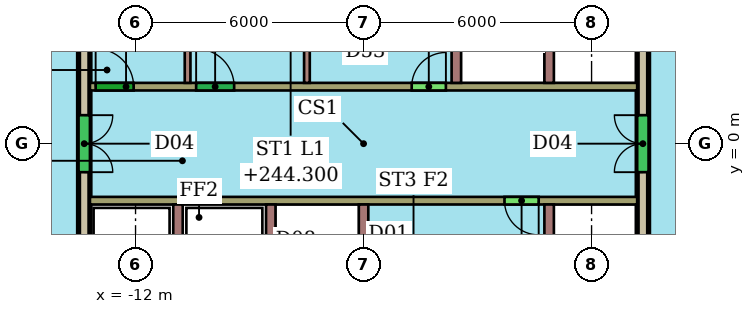
"""IFC4 building model, lengths in metres.
Left out: names, types, materials, properties, quantities, classifications, styles, units other than length and angle.
Written with IfcOpenShell. Run it as: python <this file> out.ifc"""

import sys

from ifc_helpers import new_model, si_unit, direction, frame, frame_2d, origin, place, context, subcontext, project, spatial, rectangle, extrude, element, fill, save


model = new_model("IFC4")
c1 = context("Model", 3, precision=1e-05, world=origin(), true_north=direction((0.0, 1.0)))
c2 = subcontext(c1, "Body", "Model", "MODEL_VIEW")
j1 = project(units=[si_unit("LENGTHUNIT", "METRE"), si_unit("PLANEANGLEUNIT", "RADIAN")], contexts=[c1])
p1 = place(None, origin())
s1 = spatial("IfcSite", under=j1, at=p1, CompositionType="ELEMENT")
p2 = place(p1, origin())
s2 = spatial("IfcBuilding", under=s1, at=p2, CompositionType="ELEMENT")
p3 = place(p2, frame((0.0, 0.0, 242.5)))
s3 = spatial("IfcBuildingStorey", under=s2, at=p3, CompositionType="ELEMENT", Elevation=242.5)
p4 = place(p3, frame((-13.35, 7.65, 0.0), z_axis=(0.0, 0.0, 1.0), x_axis=(0.0, -1.0, 0.0)))
e1 = element("IfcWall", 1, at=p4, inside=s3, PredefinedType="SHEAR", context=c2, shape_type="SweptSolid", body=[
    extrude(rectangle(XDim=15.3, YDim=0.3, at=frame_2d((7.65, 0.0))), origin(), (0.0, 0.0, 1.0), 3.3),
])
p5 = place(p4, frame((2.34, 0.0, 0.0)))
e2 = element("IfcOpeningElement", 2, at=p5, cuts=e1, PredefinedType="OPENING", context=c2, shape_type="SweptSolid", body=[
    extrude(rectangle(XDim=1.2, YDim=2.1, at=frame_2d((0.6, 1.05))), frame((0.0, 0.16, 0.0), z_axis=(0.0, -1.0, 0.0), x_axis=(1.0, 0.0, 0.0)), (0.0, 0.0, 1.0), 0.32),
])
p6 = place(p4, frame((12.64, 0.0, 0.0)))
e3 = element("IfcOpeningElement", 3, at=p6, cuts=e1, PredefinedType="OPENING", context=c2, shape_type="SweptSolid", body=[
    extrude(rectangle(XDim=1.2, YDim=2.1, at=frame_2d((0.6, 1.05))), frame((0.0, 0.16, 0.0), z_axis=(0.0, -1.0, 0.0), x_axis=(1.0, 0.0, 0.0)), (0.0, 0.0, 1.0), 0.32),
])
p7 = place(p4, frame((6.9, 0.0, 0.0)))
e4 = element("IfcOpeningElement", 4, at=p7, cuts=e1, PredefinedType="OPENING", context=c2, shape_type="SweptSolid", body=[
    extrude(rectangle(XDim=1.5, YDim=2.1, at=frame_2d((0.75, 1.05))), frame((0.0, 0.16, 0.0), z_axis=(0.0, -1.0, 0.0), x_axis=(1.0, 0.0, 0.0)), (0.0, 0.0, 1.0), 0.32),
])
p8 = place(p3, frame((1.35, -7.65, 0.0), z_axis=(0.0, 0.0, 1.0), x_axis=(0.0, 1.0, 0.0)))
e5 = element("IfcWall", 5, at=p8, inside=s3, PredefinedType="SHEAR", context=c2, shape_type="SweptSolid", body=[
    extrude(rectangle(XDim=15.3, YDim=0.3, at=frame_2d((7.65, 0.0))), origin(), (0.0, 0.0, 1.0), 3.3),
])
p9 = place(p8, frame((11.76, 0.0, 0.0)))
e6 = element("IfcOpeningElement", 6, at=p9, cuts=e5, PredefinedType="OPENING", context=c2, shape_type="SweptSolid", body=[
    extrude(rectangle(XDim=1.2, YDim=2.1, at=frame_2d((0.6, 1.05))), frame((0.0, 0.16, 0.0), z_axis=(0.0, -1.0, 0.0), x_axis=(1.0, 0.0, 0.0)), (0.0, 0.0, 1.0), 0.32),
])
p10 = place(p8, frame((1.56, 0.0, 0.0)))
e7 = element("IfcOpeningElement", 7, at=p10, cuts=e5, PredefinedType="OPENING", context=c2, shape_type="SweptSolid", body=[
    extrude(rectangle(XDim=1.0, YDim=2.1, at=frame_2d((0.5, 1.05))), frame((0.0, 0.16, 0.0), z_axis=(0.0, -1.0, 0.0), x_axis=(1.0, 0.0, 0.0)), (0.0, 0.0, 1.0), 0.32),
])
p11 = place(p8, frame((6.9, 0.0, 0.0)))
e8 = element("IfcOpeningElement", 8, at=p11, cuts=e5, PredefinedType="OPENING", context=c2, shape_type="SweptSolid", body=[
    extrude(rectangle(XDim=1.5, YDim=2.1, at=frame_2d((0.75, 1.05))), frame((0.0, 0.16, 0.0), z_axis=(0.0, -1.0, 0.0), x_axis=(1.0, 0.0, 0.0)), (0.0, 0.0, 1.0), 0.32),
])
p12 = place(p3, frame((-13.2, 1.5, 0.0), z_axis=(0.0, 0.0, 1.0), x_axis=(1.0, 0.0, 0.0)))
e9 = element("IfcWall", 9, at=p12, inside=s3, PredefinedType="SHEAR", context=c2, shape_type="SweptSolid", body=[
    extrude(rectangle(XDim=14.4, YDim=0.2, at=frame_2d((7.2, 0.0))), origin(), (0.0, 0.0, 1.0), 3.3),
])
p13 = place(p12, frame((0.15, 0.0, 0.0)))
e10 = element("IfcOpeningElement", 10, at=p13, cuts=e9, PredefinedType="OPENING", context=c2, shape_type="SweptSolid", body=[
    extrude(rectangle(XDim=1.0, YDim=2.1, at=frame_2d((0.5, 1.05))), frame((0.0, 0.11, 0.0), z_axis=(0.0, -1.0, 0.0), x_axis=(1.0, 0.0, 0.0)), (0.0, 0.0, 1.0), 0.22),
])
p14 = place(p12, frame((2.794, 0.0, 0.0)))
e11 = element("IfcOpeningElement", 11, at=p14, cuts=e9, PredefinedType="OPENING", context=c2, shape_type="SweptSolid", body=[
    extrude(rectangle(XDim=1.0, YDim=2.1, at=frame_2d((0.5, 1.05))), frame((0.0, 0.11, 0.0), z_axis=(0.0, -1.0, 0.0), x_axis=(1.0, 0.0, 0.0)), (0.0, 0.0, 1.0), 0.22),
])
p15 = place(p12, frame((8.467, 0.0, 0.0)))
e12 = element("IfcOpeningElement", 12, at=p15, cuts=e9, PredefinedType="OPENING", context=c2, shape_type="SweptSolid", body=[
    extrude(rectangle(XDim=0.9, YDim=2.1, at=frame_2d((0.45, 1.05))), frame((0.0, 0.11, 0.0), z_axis=(0.0, -1.0, 0.0), x_axis=(1.0, 0.0, 0.0)), (0.0, 0.0, 1.0), 0.22),
])
p16 = place(p3, frame((1.2, -1.5, 0.0), z_axis=(0.0, 0.0, 1.0), x_axis=(-1.0, 0.0, 0.0)))
e13 = element("IfcWall", 13, at=p16, inside=s3, PredefinedType="SHEAR", context=c2, shape_type="SweptSolid", body=[
    extrude(rectangle(XDim=14.4, YDim=0.2, at=frame_2d((7.2, 0.0))), origin(), (0.0, 0.0, 1.0), 3.3),
])
p17 = place(p16, frame((2.592, 0.0, 0.0)))
e14 = element("IfcOpeningElement", 14, at=p17, cuts=e13, PredefinedType="OPENING", context=c2, shape_type="SweptSolid", body=[
    extrude(rectangle(XDim=0.9, YDim=2.1, at=frame_2d((0.45, 1.05))), frame((0.0, 0.11, 0.0), z_axis=(0.0, -1.0, 0.0), x_axis=(1.0, 0.0, 0.0)), (0.0, 0.0, 1.0), 0.22),
])
for number, where, z_axis, x_axis in (
    (15, (-3.558, 1.6, 0.0), (0.0, 0.0, 1.0), (0.0, 1.0, 0.0)),
    (16, (-1.117, 1.6, 0.0), (0.0, 0.0, 1.0), (0.0, 1.0, 0.0)),
):
    element("IfcWall", number, at=place(p3, frame(where, z_axis=z_axis, x_axis=x_axis)), inside=s3, PredefinedType="SHEAR", context=c2, shape_type="SweptSolid", body=[
        extrude(rectangle(XDim=1.83, YDim=0.25, at=frame_2d((0.915, 0.0))), origin(), (0.0, 0.0, 1.0), 3.3),
    ])
for number, where, z_axis, x_axis in (
    (17, (-10.631, 1.6, 0.0), (0.0, 0.0, 1.0), (0.0, 1.0, 0.0)),
    (18, (-7.49, 1.6, 0.0), (0.0, 0.0, 1.0), (0.0, 1.0, 0.0)),
):
    element("IfcWall", number, at=place(p3, frame(where, z_axis=z_axis, x_axis=x_axis)), inside=s3, PredefinedType="PARTITIONING", context=c2, shape_type="SweptSolid", body=[
        extrude(rectangle(XDim=1.83, YDim=0.15, at=frame_2d((0.915, 0.0))), origin(), (0.0, 0.0, 1.0), 3.3),
    ])
for number, where, z_axis, x_axis in (
    (19, (-10.883, -1.6, 0.0), (0.0, 0.0, 1.0), (0.0, -1.0, 0.0)),
    (20, (-8.442, -1.6, 0.0), (0.0, 0.0, 1.0), (0.0, -1.0, 0.0)),
    (21, (-6.0, -1.6, 0.0), (0.0, 0.0, 1.0), (0.0, -1.0, 0.0)),
    (22, (-1.117, -1.6, 0.0), (0.0, 0.0, 1.0), (0.0, -1.0, 0.0)),
):
    element("IfcWall", number, at=place(p3, frame(where, z_axis=z_axis, x_axis=x_axis)), inside=s3, PredefinedType="SHEAR", context=c2, shape_type="SweptSolid", body=[
        extrude(rectangle(XDim=1.83, YDim=0.25, at=frame_2d((0.915, 0.0))), origin(), (0.0, 0.0, 1.0), 3.3),
    ])
p18 = place(p7, origin())
e23 = element("IfcDoor", 23, at=p18, inside=s3, OperationType="DOUBLE_DOOR_SINGLE_SWING", PredefinedType="NOTDEFINED", context=c2, shape_type="SweptSolid", body=[
    extrude(rectangle(XDim=1.5, YDim=2.1, at=frame_2d((0.75, 1.05))), frame((0.0, 0.025, 0.0), z_axis=(0.0, -1.0, 0.0), x_axis=(1.0, 0.0, 0.0)), (0.0, 0.0, 1.0), 0.05),
])
fill(e4, e23)
p19 = place(p11, origin())
e24 = element("IfcDoor", 24, at=p19, inside=s3, OperationType="DOUBLE_DOOR_SINGLE_SWING", PredefinedType="NOTDEFINED", context=c2, shape_type="SweptSolid", body=[
    extrude(rectangle(XDim=1.5, YDim=2.1, at=frame_2d((0.75, 1.05))), frame((0.0, 0.025, 0.0), z_axis=(0.0, -1.0, 0.0), x_axis=(1.0, 0.0, 0.0)), (0.0, 0.0, 1.0), 0.05),
])
fill(e8, e24)
p20 = place(p13, origin())
e25 = element("IfcDoor", 25, at=p20, inside=s3, OperationType="SINGLE_SWING_LEFT", PredefinedType="NOTDEFINED", context=c2, shape_type="SweptSolid", body=[
    extrude(rectangle(XDim=1.0, YDim=2.1, at=frame_2d((0.5, 1.05))), frame((0.0, 0.025, 0.0), z_axis=(0.0, -1.0, 0.0), x_axis=(1.0, 0.0, 0.0)), (0.0, 0.0, 1.0), 0.05),
])
fill(e10, e25)
p21 = place(p14, origin())
e26 = element("IfcDoor", 26, at=p21, inside=s3, OperationType="SINGLE_SWING_LEFT", PredefinedType="NOTDEFINED", context=c2, shape_type="SweptSolid", body=[
    extrude(rectangle(XDim=1.0, YDim=2.1, at=frame_2d((0.5, 1.05))), frame((0.0, 0.025, 0.0), z_axis=(0.0, -1.0, 0.0), x_axis=(1.0, 0.0, 0.0)), (0.0, 0.0, 1.0), 0.05),
])
fill(e11, e26)
p22 = place(p15, origin())
e27 = element("IfcDoor", 27, at=p22, inside=s3, OperationType="SINGLE_SWING_RIGHT", PredefinedType="NOTDEFINED", context=c2, shape_type="SweptSolid", body=[
    extrude(rectangle(XDim=0.9, YDim=2.1, at=frame_2d((0.45, 1.05))), frame((0.0, 0.025, 0.0), z_axis=(0.0, -1.0, 0.0), x_axis=(1.0, 0.0, 0.0)), (0.0, 0.0, 1.0), 0.05),
])
fill(e12, e27)
p23 = place(p17, origin())
e28 = element("IfcDoor", 28, at=p23, inside=s3, OperationType="SINGLE_SWING_LEFT", PredefinedType="NOTDEFINED", context=c2, shape_type="SweptSolid", body=[
    extrude(rectangle(XDim=0.9, YDim=2.1, at=frame_2d((0.45, 1.05))), frame((0.0, 0.025, 0.0), z_axis=(0.0, -1.0, 0.0), x_axis=(1.0, 0.0, 0.0)), (0.0, 0.0, 1.0), 0.05),
])
fill(e14, e28)
save(model, sys.argv[1])
